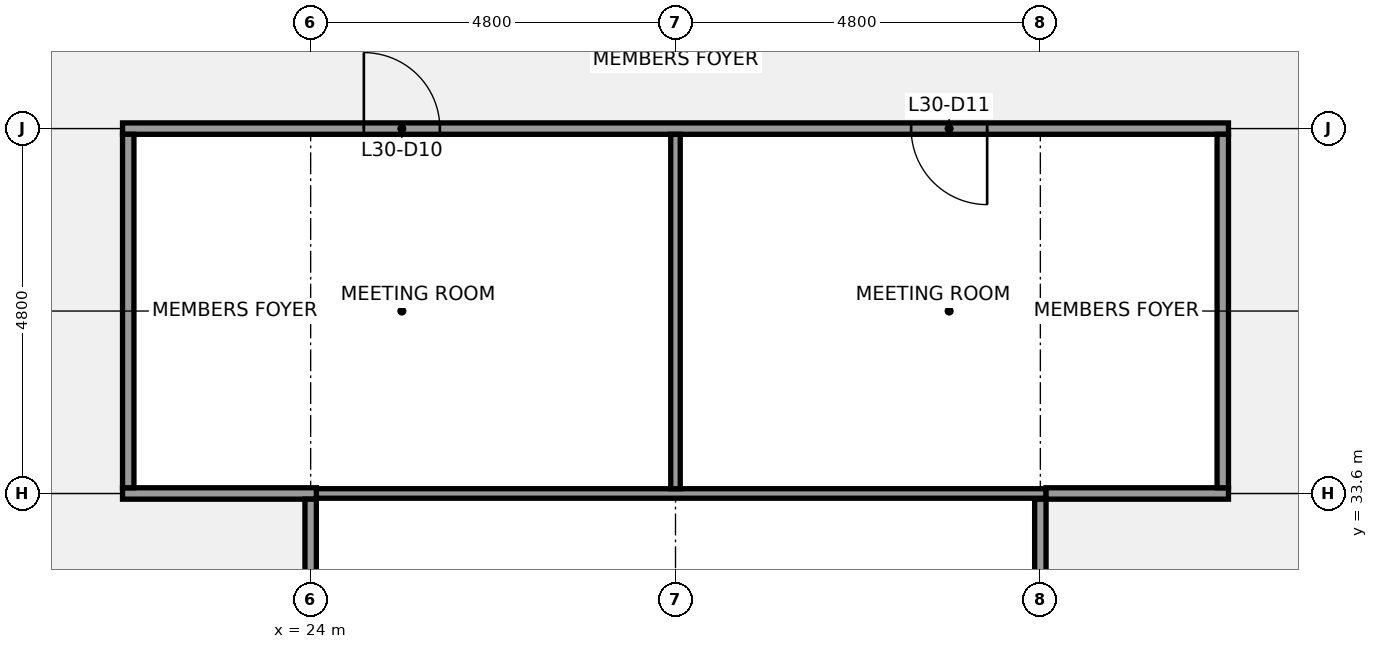
"""IFC4 building model, lengths in metres.
Left out: names, types, materials, properties, quantities, classifications, styles, units other than length and angle.
Written with IfcOpenShell. Run it as: python <this file> out.ifc"""

import sys

from ifc_helpers import new_model, si_unit, direction, frame, frame_2d, origin, place, context, subcontext, project, spatial, rectangle, extrude, element, fill, save


model = new_model("IFC4")
c1 = context("Model", 3, precision=1e-05, world=origin(), true_north=direction((0.0, 1.0)))
c2 = subcontext(c1, "Body", "Model", "MODEL_VIEW")
j1 = project(units=[si_unit("LENGTHUNIT", "METRE"), si_unit("PLANEANGLEUNIT", "RADIAN")], contexts=[c1])
p1 = place(None, origin())
s1 = spatial("IfcSite", under=j1, at=p1, CompositionType="ELEMENT")
p2 = place(p1, origin())
s2 = spatial("IfcBuilding", under=s1, at=p2, CompositionType="ELEMENT")
p3 = place(p2, frame((0.0, 0.0, 140.1)))
s3 = spatial("IfcBuildingStorey", under=s2, at=p3, CompositionType="ELEMENT", Elevation=140.1)
p4 = place(p3, frame((24.075, 33.6, 0.0), z_axis=(0.0, 0.0, 1.0), x_axis=(1.0, 0.0, 0.0)))
e1 = element("IfcWall", 1, at=p4, inside=s3, PredefinedType="PARTITIONING", context=c2, shape_type="SweptSolid", body=[
    extrude(rectangle(XDim=9.6, YDim=0.125, at=frame_2d((4.8, 0.0))), origin(), (0.0, 0.0, 1.0), 2.936),
])
p5 = place(p3, frame((21.525, 33.6, 0.0), z_axis=(0.0, 0.0, 1.0), x_axis=(1.0, 0.0, 0.0)))
e2 = element("IfcWall", 2, at=p5, inside=s3, PredefinedType="PARTITIONING", context=c2, shape_type="SweptSolid", body=[
    extrude(rectangle(XDim=2.55, YDim=0.15, at=frame_2d((1.275, 0.0))), origin(), (0.0, 0.0, 1.0), 2.936),
])
p6 = place(p3, frame((33.675, 33.6, 0.0), z_axis=(0.0, 0.0, 1.0), x_axis=(1.0, 0.0, 0.0)))
e3 = element("IfcWall", 3, at=p6, inside=s3, PredefinedType="PARTITIONING", context=c2, shape_type="SweptSolid", body=[
    extrude(rectangle(XDim=2.4, YDim=0.15, at=frame_2d((1.2, 0.0))), origin(), (0.0, 0.0, 1.0), 2.936),
])
p7 = place(p3, frame((21.525, 38.4, 0.0), z_axis=(0.0, 0.0, 1.0), x_axis=(1.0, 0.0, 0.0)))
e4 = element("IfcWall", 4, at=p7, inside=s3, PredefinedType="PARTITIONING", context=c2, shape_type="SweptSolid", body=[
    extrude(rectangle(XDim=14.55, YDim=0.15, at=frame_2d((7.275, 0.0))), origin(), (0.0, 0.0, 1.0), 2.936),
])
p8 = place(p7, frame((3.175, 0.0, 0.0)))
e5 = element("IfcOpeningElement", 5, at=p8, cuts=e4, PredefinedType="OPENING", context=c2, shape_type="SweptSolid", body=[
    extrude(rectangle(XDim=1.0, YDim=2.1, at=frame_2d((0.5, 1.05))), frame((0.0, 0.085, 0.0), z_axis=(0.0, -1.0, 0.0), x_axis=(1.0, 0.0, 0.0)), (0.0, 0.0, 1.0), 0.17),
])
p9 = place(p7, frame((10.375, 0.0, 0.0)))
e6 = element("IfcOpeningElement", 6, at=p9, cuts=e4, PredefinedType="OPENING", context=c2, shape_type="SweptSolid", body=[
    extrude(rectangle(XDim=1.0, YDim=2.1, at=frame_2d((0.5, 1.05))), frame((0.0, 0.085, 0.0), z_axis=(0.0, -1.0, 0.0), x_axis=(1.0, 0.0, 0.0)), (0.0, 0.0, 1.0), 0.17),
])
for number, where, z_axis, x_axis in (
    (7, (21.6, 33.675, 0.0), (0.0, 0.0, 1.0), (0.0, 1.0, 0.0)),
    (8, (24.0, 28.875, 0.0), (0.0, 0.0, 1.0), (0.0, 1.0, 0.0)),
):
    element("IfcWall", number, at=place(p3, frame(where, z_axis=z_axis, x_axis=x_axis)), inside=s3, PredefinedType="PARTITIONING", context=c2, shape_type="SweptSolid", body=[
        extrude(rectangle(XDim=4.65, YDim=0.15, at=frame_2d((2.325, 0.0))), origin(), (0.0, 0.0, 1.0), 2.936),
    ])
p10 = place(p3, frame((28.8, 33.663, 0.0), z_axis=(0.0, 0.0, 1.0), x_axis=(0.0, 1.0, 0.0)))
e9 = element("IfcWall", 9, at=p10, inside=s3, PredefinedType="PARTITIONING", context=c2, shape_type="SweptSolid", body=[
    extrude(rectangle(XDim=4.662, YDim=0.125, at=frame_2d((2.331, 0.0))), origin(), (0.0, 0.0, 1.0), 2.936),
])
for number, where, z_axis, x_axis in (
    (10, (33.6, 28.875, 0.0), (0.0, 0.0, 1.0), (0.0, 1.0, 0.0)),
    (11, (36.0, 33.675, 0.0), (0.0, 0.0, 1.0), (0.0, 1.0, 0.0)),
):
    element("IfcWall", number, at=place(p3, frame(where, z_axis=z_axis, x_axis=x_axis)), inside=s3, PredefinedType="PARTITIONING", context=c2, shape_type="SweptSolid", body=[
        extrude(rectangle(XDim=4.65, YDim=0.15, at=frame_2d((2.325, 0.0))), origin(), (0.0, 0.0, 1.0), 2.936),
    ])
p11 = place(p8, origin())
e12 = element("IfcDoor", 12, at=p11, inside=s3, OperationType="SINGLE_SWING_LEFT", PredefinedType="DOOR", context=c2, shape_type="SweptSolid", body=[
    extrude(rectangle(XDim=1.0, YDim=2.1, at=frame_2d((0.5, 1.05))), frame((0.0, 0.025, 0.0), z_axis=(0.0, -1.0, 0.0), x_axis=(1.0, 0.0, 0.0)), (0.0, 0.0, 1.0), 0.05),
])
fill(e5, e12)
p12 = place(p9, origin())
e13 = element("IfcDoor", 13, at=p12, inside=s3, OperationType="SINGLE_SWING_RIGHT", PredefinedType="DOOR", context=c2, shape_type="SweptSolid", body=[
    extrude(rectangle(XDim=1.0, YDim=2.1, at=frame_2d((0.5, 1.05))), frame((0.0, 0.025, 0.0), z_axis=(0.0, -1.0, 0.0), x_axis=(1.0, 0.0, 0.0)), (0.0, 0.0, 1.0), 0.05),
])
fill(e6, e13)
save(model, sys.argv[1])
